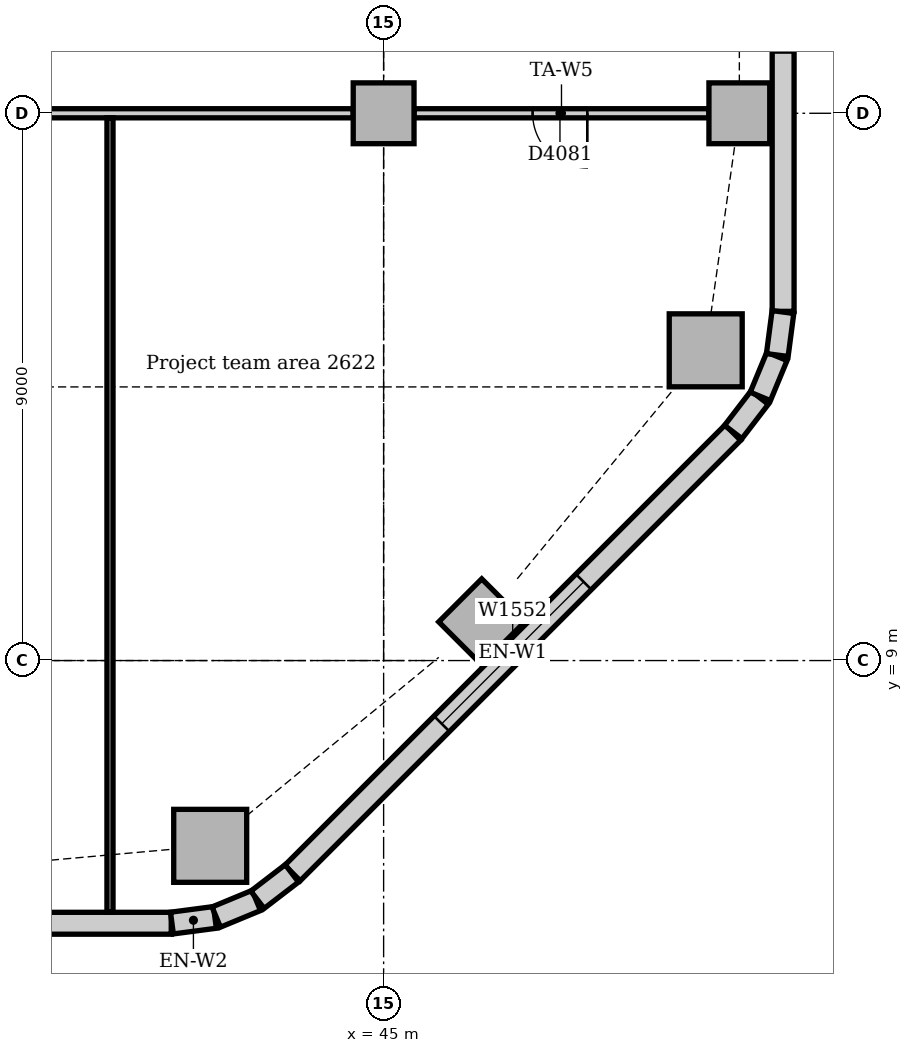
"""IFC4 building model, lengths in metres.
Left out: names, types, materials, properties, quantities, classifications, styles, units other than length and angle.
Written with IfcOpenShell. Run it as: python <this file> out.ifc"""

import sys

from ifc_helpers import new_model, si_unit, direction, frame, frame_2d, origin, origin_2d, place, context, subcontext, project, spatial, rectangle, extrude, element, fill, save


model = new_model("IFC4")
c1 = context("Model", 3, precision=1e-05, world=origin(), true_north=direction((0.0, 1.0)))
c2 = subcontext(c1, "Body", "Model", "MODEL_VIEW")
j1 = project(units=[si_unit("LENGTHUNIT", "METRE"), si_unit("PLANEANGLEUNIT", "RADIAN")], contexts=[c1])
p1 = place(None, origin())
s1 = spatial("IfcSite", under=j1, at=p1, CompositionType="ELEMENT")
p2 = place(p1, origin())
s2 = spatial("IfcBuilding", under=s1, at=p2, CompositionType="ELEMENT")
p3 = place(p2, frame((0.0, 0.0, 112.0)))
s3 = spatial("IfcBuildingStorey", under=s2, at=p3, CompositionType="ELEMENT", Elevation=112.0)
for number, where, z_axis, x_axis in (
    (1, (42.148, 5.953, 0.0), (0.0, 0.0, 1.0), (1.0, 0.0, 0.0)),
    (2, (50.297, 14.102, 0.0), (0.0, 0.0, 1.0), (1.0, 0.0, 0.0)),
):
    element("IfcColumn", number, at=place(p3, frame(where, z_axis=z_axis, x_axis=x_axis)), inside=s3, PredefinedType="COLUMN", context=c2, shape_type="SweptSolid", body=[
        extrude(rectangle(XDim=1.2, YDim=1.2, at=origin_2d()), origin(), (0.0, 0.0, 1.0), 3.85),
    ])
for number, where, z_axis, x_axis in (
    (3, (46.614, 9.636, 0.0), (0.0, 0.0, 1.0), (0.707, 0.707, 0.0)),
    (4, (50.85, 18.0, 0.0), (0.0, 0.0, 1.0), (1.0, 0.0, 0.0)),
    (5, (45.0, 18.0, 0.0), (0.0, 0.0, 1.0), (1.0, 0.0, 0.0)),
):
    element("IfcColumn", number, at=place(p3, frame(where, z_axis=z_axis, x_axis=x_axis)), inside=s3, PredefinedType="COLUMN", context=c2, shape_type="SweptSolid", body=[
        extrude(rectangle(XDim=1.0, YDim=1.0, at=origin_2d()), origin(), (0.0, 0.0, 1.0), 3.85),
    ])
p4 = place(p3, frame((4.243, 4.68, 0.0), z_axis=(0.0, 0.0, 1.0), x_axis=(1.0, 0.0, 0.0)))
e6 = element("IfcWall", 6, at=p4, inside=s3, PredefinedType="STANDARD", context=c2, shape_type="SweptSolid", body=[
    extrude(rectangle(XDim=37.265, YDim=0.36, at=frame_2d((18.632, 0.0))), origin(), (0.0, 0.0, 1.0), 3.85),
])
p5 = place(p4, frame((3.482, 0.0, 0.9)))
e7 = element("IfcOpeningElement", 7, at=p5, cuts=e6, PredefinedType="OPENING", context=c2, shape_type="SweptSolid", body=[
    extrude(rectangle(XDim=3.3, YDim=1.6, at=frame_2d((1.65, 0.8))), frame((0.0, 0.19, 0.0), z_axis=(0.0, -1.0, 0.0), x_axis=(1.0, 0.0, 0.0)), (0.0, 0.0, 1.0), 0.38),
])
p6 = place(p4, frame((9.432, 0.0, 0.9)))
e8 = element("IfcOpeningElement", 8, at=p6, cuts=e6, PredefinedType="OPENING", context=c2, shape_type="SweptSolid", body=[
    extrude(rectangle(XDim=1.8, YDim=1.6, at=frame_2d((0.9, 0.8))), frame((0.0, 0.19, 0.0), z_axis=(0.0, -1.0, 0.0), x_axis=(1.0, 0.0, 0.0)), (0.0, 0.0, 1.0), 0.38),
])
p7 = place(p4, frame((12.482, 0.0, 0.9)))
e9 = element("IfcOpeningElement", 9, at=p7, cuts=e6, PredefinedType="OPENING", context=c2, shape_type="SweptSolid", body=[
    extrude(rectangle(XDim=3.3, YDim=1.6, at=frame_2d((1.65, 0.8))), frame((0.0, 0.19, 0.0), z_axis=(0.0, -1.0, 0.0), x_axis=(1.0, 0.0, 0.0)), (0.0, 0.0, 1.0), 0.38),
])
p8 = place(p4, frame((16.982, 0.0, 0.9)))
e10 = element("IfcOpeningElement", 10, at=p8, cuts=e6, PredefinedType="OPENING", context=c2, shape_type="SweptSolid", body=[
    extrude(rectangle(XDim=3.3, YDim=1.6, at=frame_2d((1.65, 0.8))), frame((0.0, 0.19, 0.0), z_axis=(0.0, -1.0, 0.0), x_axis=(1.0, 0.0, 0.0)), (0.0, 0.0, 1.0), 0.38),
])
p9 = place(p4, frame((21.482, 0.0, 0.9)))
e11 = element("IfcOpeningElement", 11, at=p9, cuts=e6, PredefinedType="OPENING", context=c2, shape_type="SweptSolid", body=[
    extrude(rectangle(XDim=3.3, YDim=1.6, at=frame_2d((1.65, 0.8))), frame((0.0, 0.19, 0.0), z_axis=(0.0, -1.0, 0.0), x_axis=(1.0, 0.0, 0.0)), (0.0, 0.0, 1.0), 0.38),
])
p10 = place(p4, frame((25.982, 0.0, 0.9)))
e12 = element("IfcOpeningElement", 12, at=p10, cuts=e6, PredefinedType="OPENING", context=c2, shape_type="SweptSolid", body=[
    extrude(rectangle(XDim=3.3, YDim=1.6, at=frame_2d((1.65, 0.8))), frame((0.0, 0.19, 0.0), z_axis=(0.0, -1.0, 0.0), x_axis=(1.0, 0.0, 0.0)), (0.0, 0.0, 1.0), 0.38),
])
p11 = place(p4, frame((30.482, 0.0, 0.9)))
e13 = element("IfcOpeningElement", 13, at=p11, cuts=e6, PredefinedType="OPENING", context=c2, shape_type="SweptSolid", body=[
    extrude(rectangle(XDim=3.3, YDim=1.6, at=frame_2d((1.65, 0.8))), frame((0.0, 0.19, 0.0), z_axis=(0.0, -1.0, 0.0), x_axis=(1.0, 0.0, 0.0)), (0.0, 0.0, 1.0), 0.38),
])
p12 = place(p3, frame((43.501, 5.506, 0.0), z_axis=(0.0, 0.0, 1.0), x_axis=(0.707106781187, 0.707106781187, 0.0)))
e14 = element("IfcWall", 14, at=p12, inside=s3, PredefinedType="STANDARD", context=c2, shape_type="SweptSolid", body=[
    extrude(rectangle(XDim=10.243, YDim=0.36, at=frame_2d((5.121, 0.0))), origin(), (0.0, 0.0, 1.0), 3.85),
])
p13 = place(p12, frame((3.471, 0.0, 0.9)))
e15 = element("IfcOpeningElement", 15, at=p13, cuts=e14, PredefinedType="OPENING", context=c2, shape_type="SweptSolid", body=[
    extrude(rectangle(XDim=3.3, YDim=1.6, at=frame_2d((1.65, 0.8))), frame((0.0, 0.19, 0.0), z_axis=(0.0, -1.0, 0.0), x_axis=(1.0, 0.0, 0.0)), (0.0, 0.0, 1.0), 0.38),
])
p14 = place(p3, frame((51.57, 14.743, 0.0), z_axis=(0.0, 0.0, 1.0), x_axis=(0.0, 1.0, 0.0)))
e16 = element("IfcWall", 16, at=p14, inside=s3, PredefinedType="STANDARD", context=c2, shape_type="SweptSolid", body=[
    extrude(rectangle(XDim=24.515, YDim=0.36, at=frame_2d((12.257, 0.0))), origin(), (0.0, 0.0, 1.0), 3.85),
])
p15 = place(p14, frame((4.257, 0.0, 0.9)))
e17 = element("IfcOpeningElement", 17, at=p15, cuts=e16, PredefinedType="OPENING", context=c2, shape_type="SweptSolid", body=[
    extrude(rectangle(XDim=1.8, YDim=1.6, at=frame_2d((0.9, 0.8))), frame((0.0, 0.19, 0.0), z_axis=(0.0, -1.0, 0.0), x_axis=(1.0, 0.0, 0.0)), (0.0, 0.0, 1.0), 0.38),
])
p16 = place(p14, frame((8.057, 0.0, 0.9)))
e18 = element("IfcOpeningElement", 18, at=p16, cuts=e16, PredefinedType="OPENING", context=c2, shape_type="SweptSolid", body=[
    extrude(rectangle(XDim=3.3, YDim=1.6, at=frame_2d((1.65, 0.8))), frame((0.0, 0.19, 0.0), z_axis=(0.0, -1.0, 0.0), x_axis=(1.0, 0.0, 0.0)), (0.0, 0.0, 1.0), 0.38),
])
p17 = place(p14, frame((12.857, 0.0, 0.9)))
e19 = element("IfcOpeningElement", 19, at=p17, cuts=e16, PredefinedType="OPENING", context=c2, shape_type="SweptSolid", body=[
    extrude(rectangle(XDim=3.3, YDim=1.6, at=frame_2d((1.65, 0.8))), frame((0.0, 0.19, 0.0), z_axis=(0.0, -1.0, 0.0), x_axis=(1.0, 0.0, 0.0)), (0.0, 0.0, 1.0), 0.38),
])
p18 = place(p14, frame((17.357, 0.0, 0.9)))
e20 = element("IfcOpeningElement", 20, at=p18, cuts=e16, PredefinedType="OPENING", context=c2, shape_type="SweptSolid", body=[
    extrude(rectangle(XDim=3.3, YDim=1.6, at=frame_2d((1.65, 0.8))), frame((0.0, 0.19, 0.0), z_axis=(0.0, -1.0, 0.0), x_axis=(1.0, 0.0, 0.0)), (0.0, 0.0, 1.0), 0.38),
])
for number, where, z_axis, x_axis in (
    (21, (41.519, 4.683, 0.0), (0.0, 0.0, 1.0), (0.991, 0.131, 0.0)),
    (22, (42.247, 4.782, 0.0), (0.0, 0.0, 1.0), (0.924, 0.383, 0.0)),
):
    element("IfcWall", number, at=place(p3, frame(where, z_axis=z_axis, x_axis=x_axis)), inside=s3, PredefinedType="STANDARD", context=c2, shape_type="SweptSolid", body=[
        extrude(rectangle(XDim=0.713, YDim=0.36, at=frame_2d((0.356, 0.0))), origin(), (0.0, 0.0, 1.0), 3.85),
    ])
for number, where, z_axis, x_axis in (
    (23, (42.925, 5.066, 0.0), (0.0, 0.0, 1.0), (0.793, 0.609, 0.0)),
    (24, (50.75, 12.759, 0.0), (0.0, 0.0, 1.0), (0.609, 0.793, 0.0)),
):
    element("IfcWall", number, at=place(p3, frame(where, z_axis=z_axis, x_axis=x_axis)), inside=s3, PredefinedType="STANDARD", context=c2, shape_type="SweptSolid", body=[
        extrude(rectangle(XDim=0.713, YDim=0.36, at=frame_2d((0.357, 0.0))), origin(), (0.0, 0.0, 1.0), 3.85),
    ])
for number, where, z_axis, x_axis in (
    (25, (51.195, 13.344, 0.0), (0.0, 0.0, 1.0), (0.383, 0.924, 0.0)),
    (26, (51.474, 14.024, 0.0), (0.0, 0.0, 1.0), (0.131, 0.991, 0.0)),
):
    element("IfcWall", number, at=place(p3, frame(where, z_axis=z_axis, x_axis=x_axis)), inside=s3, PredefinedType="STANDARD", context=c2, shape_type="SweptSolid", body=[
        extrude(rectangle(XDim=0.713, YDim=0.36, at=frame_2d((0.356, 0.0))), origin(), (0.0, 0.0, 1.0), 3.85),
    ])
p19 = place(p3, frame((45.5, 18.0, 0.0), z_axis=(0.0, 0.0, 1.0), x_axis=(1.0, 0.0, 0.0)))
e27 = element("IfcWall", 27, at=p19, inside=s3, PredefinedType="PARTITIONING", context=c2, shape_type="SweptSolid", body=[
    extrude(rectangle(XDim=4.85, YDim=0.15, at=frame_2d((2.425, 0.0))), origin(), (0.0, 0.0, 1.0), 3.254),
])
p20 = place(p19, frame((1.95, 0.0, 0.0)))
e28 = element("IfcOpeningElement", 28, at=p20, cuts=e27, PredefinedType="OPENING", context=c2, shape_type="SweptSolid", body=[
    extrude(rectangle(XDim=0.9, YDim=2.1, at=frame_2d((0.45, 1.05))), frame((0.0, 0.085, 0.0), z_axis=(0.0, -1.0, 0.0), x_axis=(1.0, 0.0, 0.0)), (0.0, 0.0, 1.0), 0.17),
])
p21 = place(p3, frame((36.5, 18.0, 0.0), z_axis=(0.0, 0.0, 1.0), x_axis=(1.0, 0.0, 0.0)))
e29 = element("IfcWall", 29, at=p21, inside=s3, PredefinedType="PARTITIONING", context=c2, shape_type="SweptSolid", body=[
    extrude(rectangle(XDim=8.0, YDim=0.15, at=frame_2d((4.0, 0.0))), origin(), (0.0, 0.0, 1.0), 3.158),
])
p22 = place(p3, frame((40.5, 4.86, 0.0), z_axis=(0.0, 0.0, 1.0), x_axis=(0.0, 1.0, 0.0)))
e30 = element("IfcWall", 30, at=p22, inside=s3, PredefinedType="PARTITIONING", context=c2, shape_type="SweptSolid", body=[
    extrude(rectangle(XDim=13.065, YDim=0.1, at=frame_2d((6.532, 0.0))), origin(), (0.0, 0.0, 1.0), 3.85),
])
p23 = place(p13, origin())
e31 = element("IfcWindow", 31, at=p23, inside=s3, PartitioningType="SINGLE_PANEL", PredefinedType="WINDOW", context=c2, shape_type="SweptSolid", body=[
    extrude(rectangle(XDim=3.3, YDim=1.6, at=frame_2d((1.65, 0.8))), frame((0.0, 0.13, 0.0), z_axis=(0.0, -1.0, 0.0), x_axis=(1.0, 0.0, 0.0)), (0.0, 0.0, 1.0), 0.06),
])
fill(e15, e31)
p24 = place(p20, frame((0.9, 0.0, 0.0), z_axis=(0.0, 0.0, 1.0), x_axis=(-1.0, 0.0, 0.0)))
e32 = element("IfcDoor", 32, at=p24, inside=s3, OperationType="SINGLE_SWING_LEFT", PredefinedType="DOOR", context=c2, shape_type="SweptSolid", body=[
    extrude(rectangle(XDim=0.9, YDim=2.1, at=frame_2d((0.45, 1.05))), frame((0.0, 0.025, 0.0), z_axis=(0.0, -1.0, 0.0), x_axis=(1.0, 0.0, 0.0)), (0.0, 0.0, 1.0), 0.05),
])
fill(e28, e32)
save(model, sys.argv[1])
